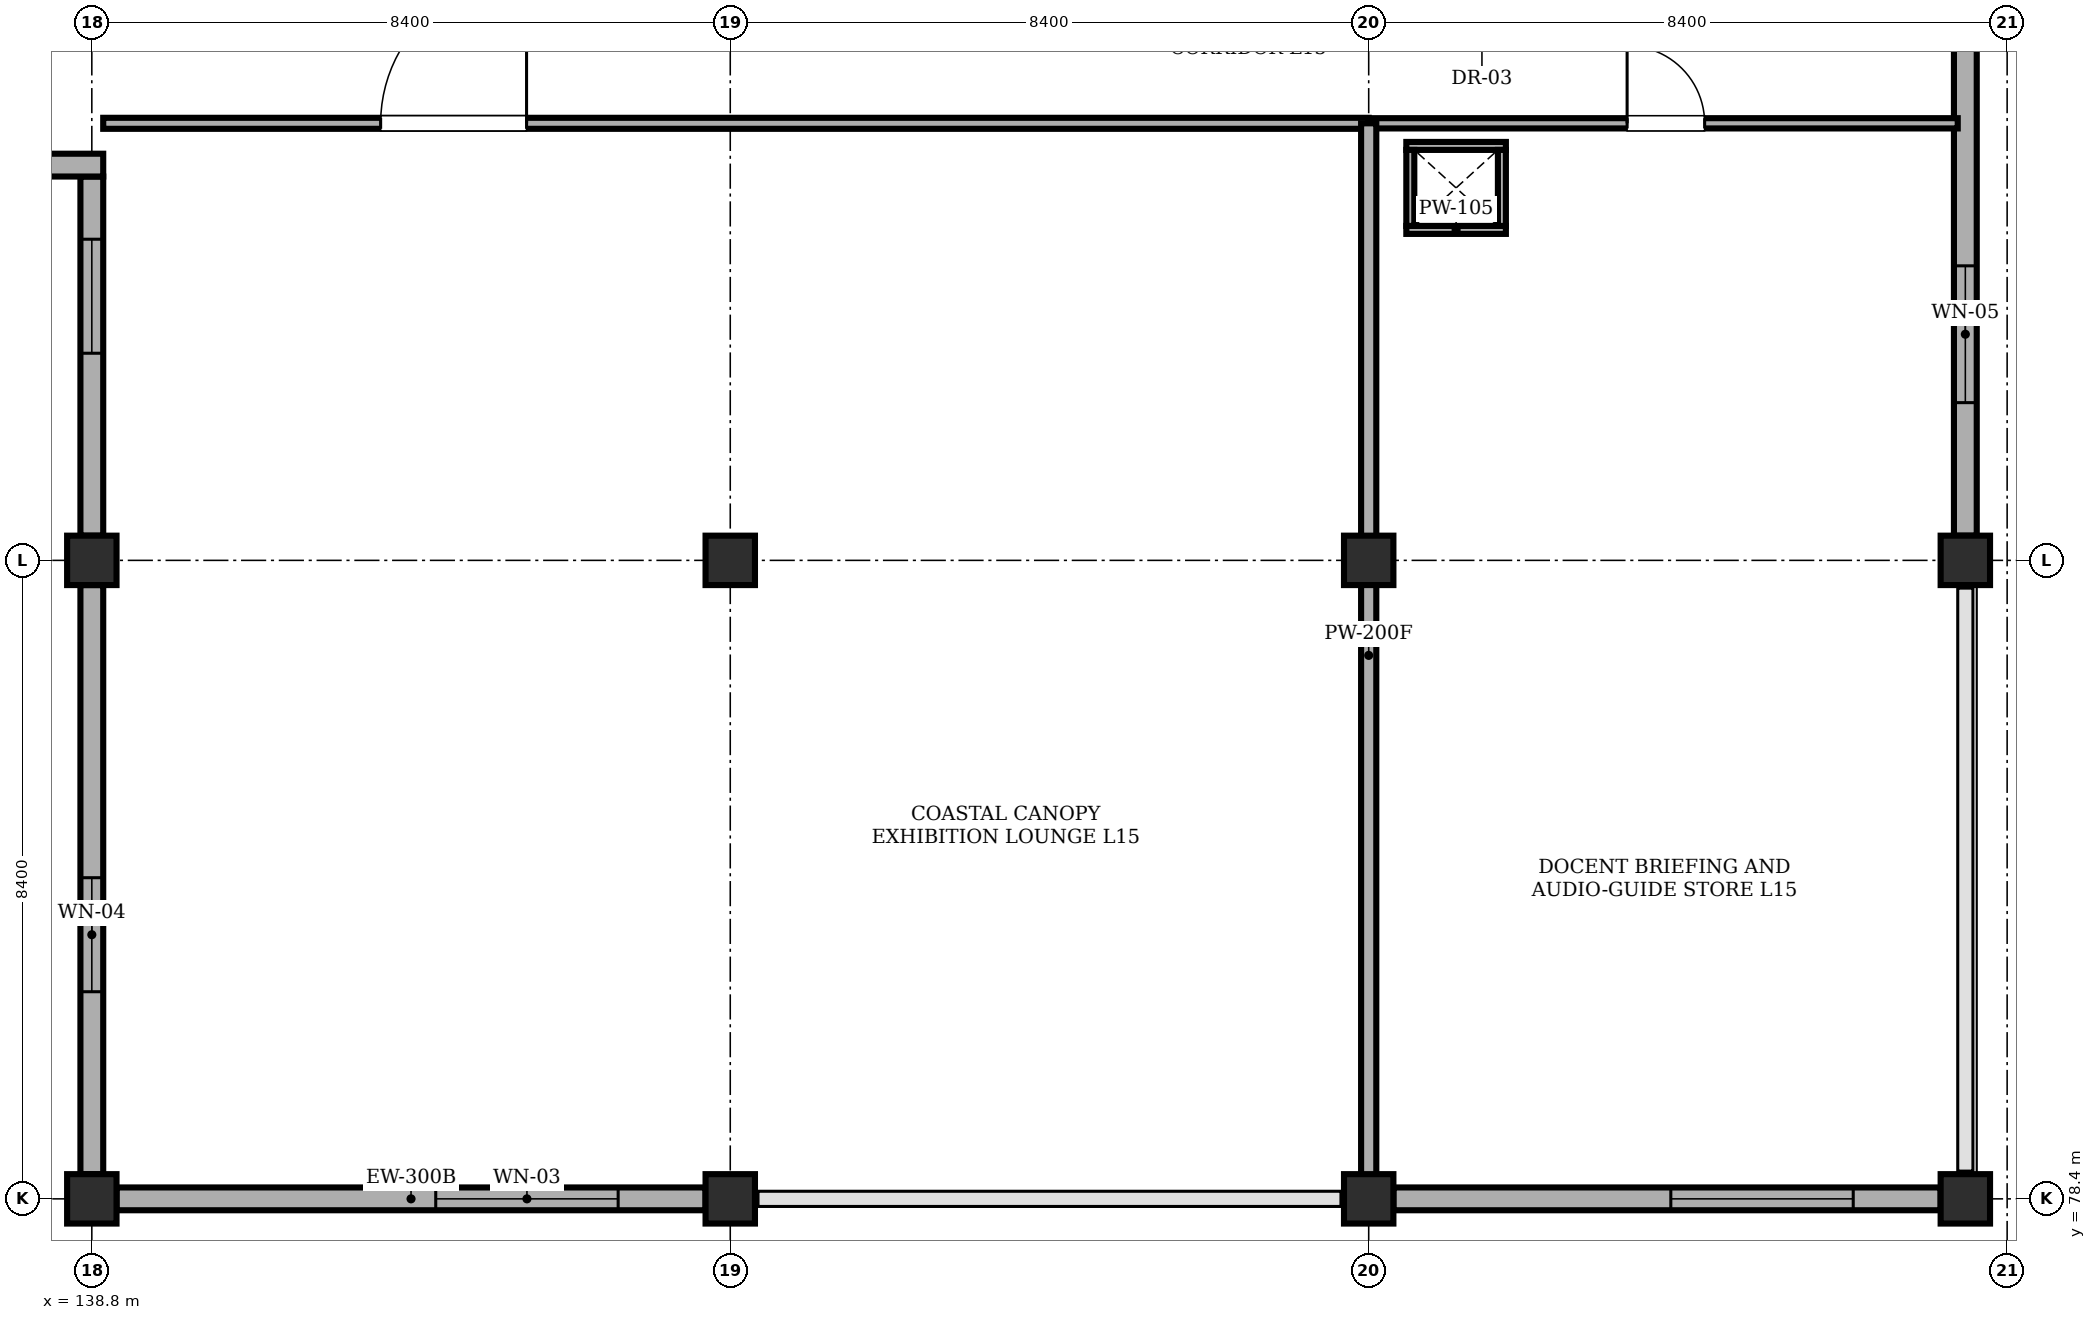
"""IFC4 building model, lengths in metres.
Left out: names, types, materials, properties, quantities, classifications, styles, units other than length and angle.
Written with IfcOpenShell. Run it as: python <this file> out.ifc"""

import sys

from ifc_helpers import new_model, si_unit, direction, frame, frame_2d, origin, origin_2d, place, context, subcontext, project, spatial, rectangle, extrude, element, fill, save


model = new_model("IFC4")
c1 = context("Model", 3, precision=1e-05, world=origin(), true_north=direction((0.0, 1.0)))
c2 = subcontext(c1, "Body", "Model", "MODEL_VIEW")
j1 = project(units=[si_unit("LENGTHUNIT", "METRE"), si_unit("PLANEANGLEUNIT", "RADIAN")], contexts=[c1])
p1 = place(None, origin())
s1 = spatial("IfcSite", under=j1, at=p1, CompositionType="ELEMENT")
p2 = place(p1, origin())
s2 = spatial("IfcBuilding", under=s1, at=p2, CompositionType="ELEMENT")
p3 = place(p2, frame((0.0, 0.0, 61.2)))
s3 = spatial("IfcBuildingStorey", under=s2, at=p3, CompositionType="ELEMENT", Elevation=61.2)
for number, where, z_axis, x_axis in (
    (1, (138.8, 78.4, 0.0), (0.0, 0.0, 1.0), (1.0, 0.0, 0.0)),
    (2, (138.8, 86.8, 0.0), (0.0, 0.0, 1.0), (1.0, 0.0, 0.0)),
    (3, (147.2, 78.4, 0.0), (0.0, 0.0, 1.0), (1.0, 0.0, 0.0)),
    (4, (147.2, 86.8, 0.0), (0.0, 0.0, 1.0), (1.0, 0.0, 0.0)),
    (5, (155.6, 78.4, 0.0), (0.0, 0.0, 1.0), (1.0, 0.0, 0.0)),
    (6, (155.6, 86.8, 0.0), (0.0, 0.0, 1.0), (1.0, 0.0, 0.0)),
    (7, (163.45, 78.4, 0.0), (0.0, 0.0, 1.0), (1.0, 0.0, 0.0)),
    (8, (163.45, 86.8, 0.0), (0.0, 0.0, 1.0), (1.0, 0.0, 0.0)),
):
    element("IfcColumn", number, at=place(p3, frame(where, z_axis=z_axis, x_axis=x_axis)), inside=s3, PredefinedType="COLUMN", context=c2, shape_type="SweptSolid", body=[
        extrude(rectangle(XDim=0.65, YDim=0.65, at=origin_2d()), origin(), (0.0, 0.0, 1.0), 4.28),
    ])
p4 = place(p3, frame((146.875, 78.4, 0.0), z_axis=(0.0, 0.0, 1.0), x_axis=(-1.0, 0.0, 0.0)))
e9 = element("IfcWall", 9, at=p4, inside=s3, PredefinedType="STANDARD", context=c2, shape_type="SweptSolid", body=[
    extrude(rectangle(XDim=7.75, YDim=0.3, at=frame_2d((3.875, 0.0))), origin(), (0.0, 0.0, 1.0), 3.58),
])
p5 = place(p4, frame((1.15, 0.0, 0.95)))
e10 = element("IfcOpeningElement", 10, at=p5, cuts=e9, PredefinedType="OPENING", context=c2, shape_type="SweptSolid", body=[
    extrude(rectangle(XDim=2.4, YDim=2.1, at=frame_2d((1.2, 1.05))), frame((0.0, 0.16, 0.0), z_axis=(0.0, -1.0, 0.0), x_axis=(1.0, 0.0, 0.0)), (0.0, 0.0, 1.0), 0.32),
])
p6 = place(p3, frame((163.125, 78.4, 0.0), z_axis=(0.0, 0.0, 1.0), x_axis=(-1.0, 0.0, 0.0)))
e11 = element("IfcWall", 11, at=p6, inside=s3, PredefinedType="STANDARD", context=c2, shape_type="SweptSolid", body=[
    extrude(rectangle(XDim=7.2, YDim=0.3, at=frame_2d((3.6, 0.0))), origin(), (0.0, 0.0, 1.0), 3.58),
])
p7 = place(p6, frame((1.15, 0.0, 0.95)))
e12 = element("IfcOpeningElement", 12, at=p7, cuts=e11, PredefinedType="OPENING", context=c2, shape_type="SweptSolid", body=[
    extrude(rectangle(XDim=2.4, YDim=2.1, at=frame_2d((1.2, 1.05))), frame((0.0, 0.16, 0.0), z_axis=(0.0, -1.0, 0.0), x_axis=(1.0, 0.0, 0.0)), (0.0, 0.0, 1.0), 0.32),
])
p8 = place(p3, frame((163.45, 94.875, 0.0), z_axis=(0.0, 0.0, 1.0), x_axis=(0.0, -1.0, 0.0)))
e13 = element("IfcWall", 13, at=p8, inside=s3, PredefinedType="STANDARD", context=c2, shape_type="SweptSolid", body=[
    extrude(rectangle(XDim=7.75, YDim=0.3, at=frame_2d((3.875, 0.0))), origin(), (0.0, 0.0, 1.0), 3.58),
])
p9 = place(p8, frame((4.2, 0.0, 1.1)))
e14 = element("IfcOpeningElement", 14, at=p9, cuts=e13, PredefinedType="OPENING", context=c2, shape_type="SweptSolid", body=[
    extrude(rectangle(XDim=1.8, YDim=1.8, at=frame_2d((0.9, 0.9))), frame((0.0, 0.16, 0.0), z_axis=(0.0, -1.0, 0.0), x_axis=(1.0, 0.0, 0.0)), (0.0, 0.0, 1.0), 0.32),
])
p10 = place(p3, frame((138.8, 78.725, 0.0), z_axis=(0.0, 0.0, 1.0), x_axis=(0.0, 1.0, 0.0)))
e15 = element("IfcWall", 15, at=p10, inside=s3, PredefinedType="STANDARD", context=c2, shape_type="SweptSolid", body=[
    extrude(rectangle(XDim=7.75, YDim=0.3, at=frame_2d((3.875, 0.0))), origin(), (0.0, 0.0, 1.0), 3.58),
])
p11 = place(p10, frame((2.4, 0.0, 0.95)))
e16 = element("IfcOpeningElement", 16, at=p11, cuts=e15, PredefinedType="OPENING", context=c2, shape_type="SweptSolid", body=[
    extrude(rectangle(XDim=1.5, YDim=1.8, at=frame_2d((0.75, 0.9))), frame((0.0, 0.16, 0.0), z_axis=(0.0, -1.0, 0.0), x_axis=(1.0, 0.0, 0.0)), (0.0, 0.0, 1.0), 0.32),
])
p12 = place(p3, frame((138.8, 87.125, 0.0), z_axis=(0.0, 0.0, 1.0), x_axis=(0.0, 1.0, 0.0)))
e17 = element("IfcWall", 17, at=p12, inside=s3, PredefinedType="STANDARD", context=c2, shape_type="SweptSolid", body=[
    extrude(rectangle(XDim=4.725, YDim=0.3, at=frame_2d((2.363, 0.0))), origin(), (0.0, 0.0, 1.0), 3.58),
])
p13 = place(p12, frame((2.4, 0.0, 0.95)))
e18 = element("IfcOpeningElement", 18, at=p13, cuts=e17, PredefinedType="OPENING", context=c2, shape_type="SweptSolid", body=[
    extrude(rectangle(XDim=1.5, YDim=1.8, at=frame_2d((0.75, 0.9))), frame((0.0, 0.16, 0.0), z_axis=(0.0, -1.0, 0.0), x_axis=(1.0, 0.0, 0.0)), (0.0, 0.0, 1.0), 0.32),
])
p14 = place(p3, frame((138.95, 92.0, 0.0), z_axis=(0.0, 0.0, 1.0), x_axis=(-1.0, 0.0, 0.0)))
e19 = element("IfcWall", 19, at=p14, inside=s3, PredefinedType="STANDARD", context=c2, shape_type="SweptSolid", body=[
    extrude(rectangle(XDim=8.7, YDim=0.3, at=frame_2d((4.35, 0.0))), origin(), (0.0, 0.0, 1.0), 4.28),
])
p15 = place(p3, frame((138.95, 92.55, 0.0), z_axis=(0.0, 0.0, 1.0), x_axis=(1.0, 0.0, 0.0)))
e20 = element("IfcWall", 20, at=p15, inside=s3, PredefinedType="PARTITIONING", context=c2, shape_type="SweptSolid", body=[
    extrude(rectangle(XDim=16.65, YDim=0.145, at=frame_2d((8.325, 0.0))), origin(), (0.0, 0.0, 1.0), 4.28),
])
p16 = place(p15, frame((3.65, 0.0, 0.0)))
e21 = element("IfcOpeningElement", 21, at=p16, cuts=e20, PredefinedType="OPENING", context=c2, shape_type="SweptSolid", body=[
    extrude(rectangle(XDim=1.92, YDim=2.28, at=frame_2d((0.96, 1.14))), frame((0.0, 0.083, 0.0), z_axis=(0.0, -1.0, 0.0), x_axis=(1.0, 0.0, 0.0)), (0.0, 0.0, 1.0), 0.165),
])
p17 = place(p3, frame((155.6, 92.55, 0.0), z_axis=(0.0, 0.0, 1.0), x_axis=(1.0, 0.0, 0.0)))
e22 = element("IfcWall", 22, at=p17, inside=s3, PredefinedType="PARTITIONING", context=c2, shape_type="SweptSolid", body=[
    extrude(rectangle(XDim=7.75, YDim=0.135, at=frame_2d((3.875, 0.0))), origin(), (0.0, 0.0, 1.0), 4.28),
])
p18 = place(p17, frame((3.4, 0.0, 0.0)))
e23 = element("IfcOpeningElement", 23, at=p18, cuts=e22, PredefinedType="OPENING", context=c2, shape_type="SweptSolid", body=[
    extrude(rectangle(XDim=1.02, YDim=2.15, at=frame_2d((0.51, 1.075))), frame((0.0, 0.077, 0.0), z_axis=(0.0, -1.0, 0.0), x_axis=(1.0, 0.0, 0.0)), (0.0, 0.0, 1.0), 0.155),
])
p19 = place(p3, frame((155.6, 78.55, 0.0), z_axis=(0.0, 0.0, 1.0), x_axis=(0.0, 1.0, 0.0)))
e24 = element("IfcWall", 24, at=p19, inside=s3, PredefinedType="SOLIDWALL", context=c2, shape_type="SweptSolid", body=[
    extrude(rectangle(XDim=14.0, YDim=0.2, at=frame_2d((7.0, 0.0))), origin(), (0.0, 0.0, 1.0), 3.58),
])
for number, where, z_axis, x_axis in (
    (25, (156.095, 91.147, 0.0), (0.0, 0.0, 1.0), (1.0, 0.0, 0.0)),
    (26, (156.095, 92.252, 0.0), (0.0, 0.0, 1.0), (1.0, 0.0, 0.0)),
):
    element("IfcWall", number, at=place(p3, frame(where, z_axis=z_axis, x_axis=x_axis)), inside=s3, PredefinedType="PARTITIONING", context=c2, shape_type="SweptSolid", body=[
        extrude(rectangle(XDim=1.31, YDim=0.105, at=frame_2d((0.655, 0.0))), origin(), (0.0, 0.0, 1.0), 4.28),
    ])
for number, where, z_axis, x_axis in (
    (27, (156.147, 91.2, 0.0), (0.0, 0.0, 1.0), (0.0, 1.0, 0.0)),
    (28, (157.353, 91.2, 0.0), (0.0, 0.0, 1.0), (0.0, 1.0, 0.0)),
):
    element("IfcWall", number, at=place(p3, frame(where, z_axis=z_axis, x_axis=x_axis)), inside=s3, PredefinedType="PARTITIONING", context=c2, shape_type="SweptSolid", body=[
        extrude(rectangle(XDim=1.0, YDim=0.105, at=frame_2d((0.5, 0.0))), origin(), (0.0, 0.0, 1.0), 4.28),
    ])
p20 = place(p5, origin())
e29 = element("IfcWindow", 29, at=p20, inside=s3, PartitioningType="TRIPLE_PANEL_VERTICAL", PredefinedType="WINDOW", context=c2, shape_type="SweptSolid", body=[
    extrude(rectangle(XDim=2.4, YDim=2.1, at=frame_2d((1.2, 1.05))), frame((0.0, 0.03, 0.0), z_axis=(0.0, -1.0, 0.0), x_axis=(1.0, 0.0, 0.0)), (0.0, 0.0, 1.0), 0.06),
])
fill(e10, e29)
p21 = place(p7, origin())
e30 = element("IfcWindow", 30, at=p21, inside=s3, PartitioningType="TRIPLE_PANEL_VERTICAL", PredefinedType="WINDOW", context=c2, shape_type="SweptSolid", body=[
    extrude(rectangle(XDim=2.4, YDim=2.1, at=frame_2d((1.2, 1.05))), frame((0.0, 0.03, 0.0), z_axis=(0.0, -1.0, 0.0), x_axis=(1.0, 0.0, 0.0)), (0.0, 0.0, 1.0), 0.06),
])
fill(e12, e30)
p22 = place(p9, origin())
e31 = element("IfcWindow", 31, at=p22, inside=s3, PartitioningType="DOUBLE_PANEL_VERTICAL", PredefinedType="WINDOW", context=c2, shape_type="SweptSolid", body=[
    extrude(rectangle(XDim=1.8, YDim=1.8, at=frame_2d((0.9, 0.9))), frame((0.0, 0.03, 0.0), z_axis=(0.0, -1.0, 0.0), x_axis=(1.0, 0.0, 0.0)), (0.0, 0.0, 1.0), 0.06),
])
fill(e14, e31)
p23 = place(p11, origin())
e32 = element("IfcWindow", 32, at=p23, inside=s3, PartitioningType="DOUBLE_PANEL_VERTICAL", PredefinedType="WINDOW", context=c2, shape_type="SweptSolid", body=[
    extrude(rectangle(XDim=1.5, YDim=1.8, at=frame_2d((0.75, 0.9))), frame((0.0, 0.03, 0.0), z_axis=(0.0, -1.0, 0.0), x_axis=(1.0, 0.0, 0.0)), (0.0, 0.0, 1.0), 0.06),
])
fill(e16, e32)
p24 = place(p13, origin())
e33 = element("IfcWindow", 33, at=p24, inside=s3, PartitioningType="DOUBLE_PANEL_VERTICAL", PredefinedType="WINDOW", context=c2, shape_type="SweptSolid", body=[
    extrude(rectangle(XDim=1.5, YDim=1.8, at=frame_2d((0.75, 0.9))), frame((0.0, 0.03, 0.0), z_axis=(0.0, -1.0, 0.0), x_axis=(1.0, 0.0, 0.0)), (0.0, 0.0, 1.0), 0.06),
])
fill(e18, e33)
p25 = place(p16, origin())
e34 = element("IfcDoor", 34, at=p25, inside=s3, OperationType="SINGLE_SWING_RIGHT", PredefinedType="DOOR", context=c2, shape_type="SweptSolid", body=[
    extrude(rectangle(XDim=1.92, YDim=2.28, at=frame_2d((0.96, 1.14))), frame((0.0, 0.025, 0.0), z_axis=(0.0, -1.0, 0.0), x_axis=(1.0, 0.0, 0.0)), (0.0, 0.0, 1.0), 0.05),
])
fill(e21, e34)
p26 = place(p18, origin())
e35 = element("IfcDoor", 35, at=p26, inside=s3, OperationType="SINGLE_SWING_LEFT", PredefinedType="DOOR", context=c2, shape_type="SweptSolid", body=[
    extrude(rectangle(XDim=1.02, YDim=2.15, at=frame_2d((0.51, 1.075))), frame((0.0, 0.025, 0.0), z_axis=(0.0, -1.0, 0.0), x_axis=(1.0, 0.0, 0.0)), (0.0, 0.0, 1.0), 0.05),
])
fill(e23, e35)
save(model, sys.argv[1])
